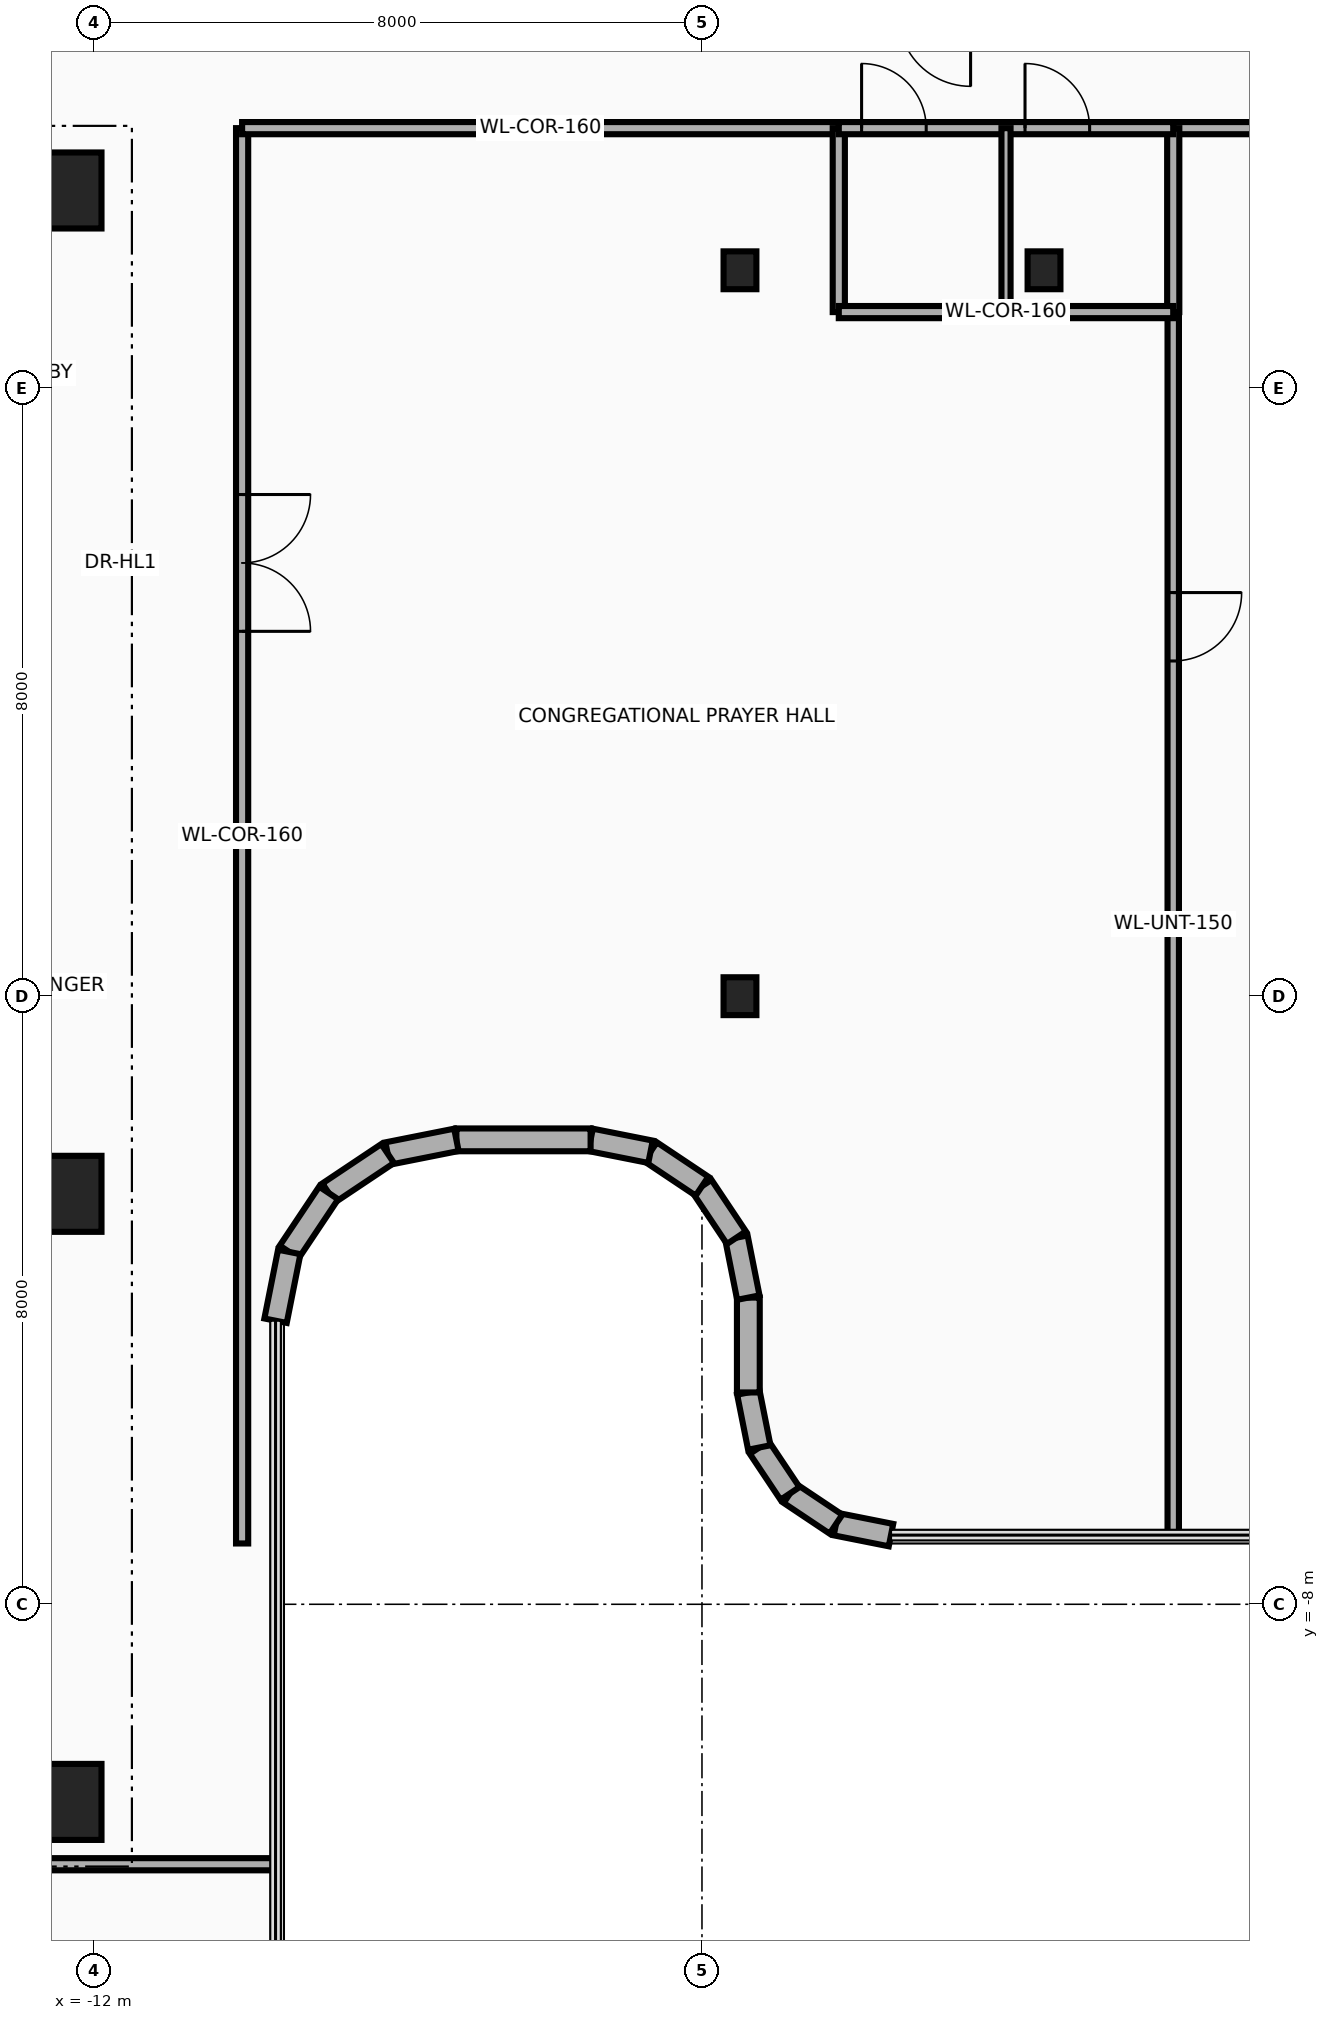
"""IFC4 building model, lengths in metres.
Left out: names, types, materials, properties, quantities, classifications, styles, units other than length and angle.
Written with IfcOpenShell. Run it as: python <this file> out.ifc"""

import sys

from ifc_helpers import new_model, si_unit, direction, frame, frame_2d, origin, origin_2d, place, context, subcontext, project, spatial, rectangle, i_section, extrude, source, transform, mapped, element, fill, save


model = new_model("IFC4")
c1 = context("Model", 3, precision=1e-05, world=origin(), true_north=direction((0.0, 1.0)))
c2 = subcontext(c1, "Body", "Model", "MODEL_VIEW")
j1 = project(units=[si_unit("LENGTHUNIT", "METRE"), si_unit("PLANEANGLEUNIT", "RADIAN")], contexts=[c1])
p1 = place(None, origin())
s1 = spatial("IfcSite", under=j1, at=p1, CompositionType="ELEMENT")
p2 = place(p1, origin())
s2 = spatial("IfcBuilding", under=s1, at=p2, CompositionType="ELEMENT")
p3 = place(p2, frame((0.0, 0.0, 180.5)))
s3 = spatial("IfcBuildingStorey", under=s2, at=p3, CompositionType="ELEMENT", Elevation=180.5)
for number, where, z_axis, x_axis in (
    (1, (-22.65, 10.8, 0.0), (0.0, 0.0, 1.0), (1.0, 0.0, 0.0)),
    (2, (-22.65, -10.8, 0.0), (0.0, 0.0, 1.0), (1.0, 0.0, 0.0)),
):
    element("IfcWall", number, at=place(p3, frame(where, z_axis=z_axis, x_axis=x_axis)), inside=s3, PredefinedType="SHEAR", context=c2, shape_type="SweptSolid", body=[
        extrude(rectangle(XDim=10.25, YDim=0.55, at=frame_2d((5.125, 0.0))), origin(), (0.0, 0.0, 1.0), 3.63),
    ])
m1 = source(origin(), c2, "Body", "SweptSolid", [
    extrude(rectangle(XDim=1.0, YDim=1.0, at=origin_2d()), origin(), (0.0, 0.0, 1.0), 3.95),
])
for number, where, z_axis, x_axis in (
    (3, (-12.4, -10.6, 0.0), (0.0, 0.0, 1.0), (1.0, 0.0, 0.0)),
    (4, (-12.4, -2.6, 0.0), (0.0, 0.0, 1.0), (1.0, 0.0, 0.0)),
    (5, (-12.4, 10.6, 0.0), (0.0, 0.0, 1.0), (1.0, 0.0, 0.0)),
):
    element("IfcColumn", number, at=place(p3, frame(where, z_axis=z_axis, x_axis=x_axis)), inside=s3, PredefinedType="COLUMN", context=c2, shape_type="MappedRepresentation", body=[
        mapped(m1, transform((0.0, 0.0, 0.0), x_axis=(1.0, 0.0, 0.0), y_axis=(0.0, 1.0, 0.0), z_axis=(0.0, 0.0, 1.0), scale=1.0)),
    ])
m2 = source(origin(), c2, "Body", "SweptSolid", [
    extrude(i_section(OverallWidth=0.432, OverallDepth=0.498, WebThickness=0.056, FlangeThickness=0.089, at=origin_2d()), origin(), (0.0, 0.0, 1.0), 3.95),
])
for number, where, z_axis, x_axis in (
    (6, (-3.5, 0.0, 0.0), (0.0, 0.0, 1.0), (1.0, 0.0, 0.0)),
    (7, (-3.5, 9.55, 0.0), (0.0, 0.0, 1.0), (1.0, 0.0, 0.0)),
    (8, (0.5, 9.55, 0.0), (0.0, 0.0, 1.0), (1.0, 0.0, 0.0)),
):
    element("IfcColumn", number, at=place(p3, frame(where, z_axis=z_axis, x_axis=x_axis)), inside=s3, PredefinedType="COLUMN", context=c2, shape_type="MappedRepresentation", body=[
        mapped(m2, transform((0.0, 0.0, 0.0), x_axis=(1.0, 0.0, 0.0), y_axis=(0.0, 1.0, 0.0), z_axis=(0.0, 0.0, 1.0), scale=1.0)),
    ])
p4 = place(p3, frame((-1.513, -7.09, 0.0), z_axis=(0.0, 0.0, 1.0), x_axis=(-0.980783640462, 0.195098566376, 0.0)))
e9 = element("IfcWall", 9, at=p4, inside=s3, PredefinedType="SOLIDWALL", context=c2, shape_type="SweptSolid", body=[
    extrude(rectangle(XDim=0.738, YDim=0.3, at=frame_2d((0.369, 0.0))), origin(), (0.0, 0.0, 1.0), 3.076),
])
p5 = place(p3, frame((-2.237, -6.946, 0.0), z_axis=(0.0, 0.0, 1.0), x_axis=(-0.831378135196, 0.555707113792, 0.0)))
e10 = element("IfcWall", 10, at=p5, inside=s3, PredefinedType="SOLIDWALL", context=c2, shape_type="SweptSolid", body=[
    extrude(rectangle(XDim=0.727, YDim=0.3, at=frame_2d((0.364, 0.0))), origin(), (0.0, 0.0, 1.0), 3.63),
])
p6 = place(p3, frame((-2.842, -6.542, 0.0), z_axis=(0.0, 0.0, 1.0), x_axis=(-0.555784030735, 0.83132671747, 0.0)))
e11 = element("IfcWall", 11, at=p6, inside=s3, PredefinedType="SOLIDWALL", context=c2, shape_type="SweptSolid", body=[
    extrude(rectangle(XDim=0.728, YDim=0.3, at=frame_2d((0.364, 0.0))), origin(), (0.0, 0.0, 1.0), 2.615),
])
p7 = place(p3, frame((-3.246, -5.937, 0.0), z_axis=(0.0, 0.0, 1.0), x_axis=(-0.194780446724, 0.980846867546, 0.0)))
e12 = element("IfcWall", 12, at=p7, inside=s3, PredefinedType="SOLIDWALL", context=c2, shape_type="SweptSolid", body=[
    extrude(rectangle(XDim=0.738, YDim=0.3, at=frame_2d((0.369, 0.0))), origin(), (0.0, 0.0, 1.0), 2.615),
])
p8 = place(p3, frame((-3.39, -5.213, 0.0), z_axis=(0.0, 0.0, 1.0), x_axis=(0.0, 1.0, 0.0)))
e13 = element("IfcWall", 13, at=p8, inside=s3, PredefinedType="SOLIDWALL", context=c2, shape_type="SweptSolid", body=[
    extrude(rectangle(XDim=1.248, YDim=0.3, at=frame_2d((0.624, 0.0))), origin(), (0.0, 0.0, 1.0), 2.615),
])
p9 = place(p3, frame((-3.39, -3.965, 0.0), z_axis=(0.0, 0.0, 1.0), x_axis=(-0.195356525272, 0.980732291726, 0.0)))
e14 = element("IfcWall", 14, at=p9, inside=s3, PredefinedType="SOLIDWALL", context=c2, shape_type="SweptSolid", body=[
    extrude(rectangle(XDim=0.803, YDim=0.3, at=frame_2d((0.402, 0.0))), origin(), (0.0, 0.0, 1.0), 2.615),
])
for number, where, z_axis, x_axis in (
    (15, (-3.547, -3.177, 0.0), (0.0, 0.0, 1.0), (-0.556, 0.831, 0.0)),
    (16, (-4.0, -2.5, 0.0), (0.0, 0.0, 1.0), (-0.831, 0.556, 0.0)),
):
    element("IfcWall", number, at=place(p3, frame(where, z_axis=z_axis, x_axis=x_axis)), inside=s3, PredefinedType="SOLIDWALL", context=c2, shape_type="SweptSolid", body=[
        extrude(rectangle(XDim=0.815, YDim=0.3, at=frame_2d((0.407, 0.0))), origin(), (0.0, 0.0, 1.0), 2.615),
    ])
p10 = place(p3, frame((-4.677, -2.047, 0.0), z_axis=(0.0, 0.0, 1.0), x_axis=(-0.980732291726, 0.195356525272, 0.0)))
e17 = element("IfcWall", 17, at=p10, inside=s3, PredefinedType="SOLIDWALL", context=c2, shape_type="SweptSolid", body=[
    extrude(rectangle(XDim=0.803, YDim=0.3, at=frame_2d((0.402, 0.0))), origin(), (0.0, 0.0, 1.0), 3.63),
])
p11 = place(p3, frame((-5.465, -1.89, 0.0), z_axis=(0.0, 0.0, 1.0), x_axis=(-1.0, 0.0, 0.0)))
e18 = element("IfcWall", 18, at=p11, inside=s3, PredefinedType="SOLIDWALL", context=c2, shape_type="SweptSolid", body=[
    extrude(rectangle(XDim=1.766, YDim=0.3, at=frame_2d((0.883, 0.0))), origin(), (0.0, 0.0, 1.0), 3.63),
])
p12 = place(p3, frame((-7.231, -1.89, 0.0), z_axis=(0.0, 0.0, 1.0), x_axis=(-0.980743190895, -0.195301801101, 0.0)))
e19 = element("IfcWall", 19, at=p12, inside=s3, PredefinedType="SOLIDWALL", context=c2, shape_type="SweptSolid", body=[
    extrude(rectangle(XDim=0.923, YDim=0.3, at=frame_2d((0.461, 0.0))), origin(), (0.0, 0.0, 1.0), 2.415),
])
p13 = place(p3, frame((-8.135, -2.07, 0.0), z_axis=(0.0, 0.0, 1.0), x_axis=(-0.831607331814, -0.555364065883, 0.0)))
e20 = element("IfcWall", 20, at=p13, inside=s3, PredefinedType="SOLIDWALL", context=c2, shape_type="SweptSolid", body=[
    extrude(rectangle(XDim=0.933, YDim=0.3, at=frame_2d((0.467, 0.0))), origin(), (0.0, 0.0, 1.0), 2.415),
])
p14 = place(p3, frame((-8.912, -2.588, 0.0), z_axis=(0.0, 0.0, 1.0), x_axis=(-0.555364065883, -0.831607331814, 0.0)))
e21 = element("IfcWall", 21, at=p14, inside=s3, PredefinedType="SOLIDWALL", context=c2, shape_type="SweptSolid", body=[
    extrude(rectangle(XDim=0.933, YDim=0.3, at=frame_2d((0.467, 0.0))), origin(), (0.0, 0.0, 1.0), 3.63),
])
p15 = place(p3, frame((-9.43, -3.365, 0.0), z_axis=(0.0, 0.0, 1.0), x_axis=(-0.195301801101, -0.980743190895, 0.0)))
e22 = element("IfcWall", 22, at=p15, inside=s3, PredefinedType="SOLIDWALL", context=c2, shape_type="SweptSolid", body=[
    extrude(rectangle(XDim=0.923, YDim=0.3, at=frame_2d((0.461, 0.0))), origin(), (0.0, 0.0, 1.0), 3.63),
])
p16 = place(p3, frame((-23.45, -11.42, 0.0), z_axis=(0.0, 0.0, 1.0), x_axis=(1.0, 0.0, 0.0)))
e23 = element("IfcWall", 23, at=p16, inside=s3, PredefinedType="PARTITIONING", context=c2, shape_type="SweptSolid", body=[
    extrude(rectangle(XDim=13.84, YDim=0.16, at=frame_2d((6.92, 0.0))), origin(), (0.0, 0.0, 1.0), 3.004),
])
p17 = place(p3, frame((-10.05, -7.2, 0.0), z_axis=(0.0, 0.0, 1.0), x_axis=(0.0, 1.0, 0.0)))
e24 = element("IfcWall", 24, at=p17, inside=s3, PredefinedType="PARTITIONING", context=c2, shape_type="SweptSolid", body=[
    extrude(rectangle(XDim=18.62, YDim=0.16, at=frame_2d((9.31, 0.0))), origin(), (0.0, 0.0, 1.0), 2.415),
])
p18 = place(p17, frame((12.0, 0.0, 0.0)))
e25 = element("IfcOpeningElement", 25, at=p18, cuts=e24, PredefinedType="OPENING", context=c2, shape_type="SweptSolid", body=[
    extrude(rectangle(XDim=1.8, YDim=2.15, at=frame_2d((0.9, 1.075))), frame((0.0, 0.095, 0.0), z_axis=(0.0, -1.0, 0.0), x_axis=(1.0, 0.0, 0.0)), (0.0, 0.0, 1.0), 0.19),
])
p19 = place(p3, frame((-10.05, 11.42, 0.0), z_axis=(0.0, 0.0, 1.0), x_axis=(1.0, 0.0, 0.0)))
e26 = element("IfcWall", 26, at=p19, inside=s3, PredefinedType="PARTITIONING", context=c2, shape_type="SweptSolid", body=[
    extrude(rectangle(XDim=7.85, YDim=0.16, at=frame_2d((3.925, 0.0))), origin(), (0.0, 0.0, 1.0), 2.615),
])
p20 = place(p3, frame((2.2, 11.42, 0.0), z_axis=(0.0, 0.0, 1.0), x_axis=(1.0, 0.0, 0.0)))
e27 = element("IfcWall", 27, at=p20, inside=s3, PredefinedType="PARTITIONING", context=c2, shape_type="SweptSolid", body=[
    extrude(rectangle(XDim=11.22, YDim=0.16, at=frame_2d((5.61, 0.0))), origin(), (0.0, 0.0, 1.0), 2.615),
])
p21 = place(p20, frame((4.0, 0.0, 0.0)))
e28 = element("IfcOpeningElement", 28, at=p21, cuts=e27, PredefinedType="OPENING", context=c2, shape_type="SweptSolid", body=[
    extrude(rectangle(XDim=1.8, YDim=2.15, at=frame_2d((0.9, 1.075))), frame((0.0, 0.095, 0.0), z_axis=(0.0, -1.0, 0.0), x_axis=(1.0, 0.0, 0.0)), (0.0, 0.0, 1.0), 0.19),
])
p22 = place(p3, frame((2.2, -7.09, 0.0), z_axis=(0.0, 0.0, 1.0), x_axis=(0.0, 1.0, 0.0)))
e29 = element("IfcWall", 29, at=p22, inside=s3, PredefinedType="PARTITIONING", context=c2, shape_type="SweptSolid", body=[
    extrude(rectangle(XDim=16.09, YDim=0.15, at=frame_2d((8.045, 0.0))), origin(), (0.0, 0.0, 1.0), 2.665),
])
p23 = place(p22, frame((11.5, 0.0, 0.0)))
e30 = element("IfcOpeningElement", 30, at=p23, cuts=e29, PredefinedType="OPENING", context=c2, shape_type="SweptSolid", body=[
    extrude(rectangle(XDim=0.9, YDim=2.1, at=frame_2d((0.45, 1.05))), frame((0.0, 0.09, 0.0), z_axis=(0.0, -1.0, 0.0), x_axis=(1.0, 0.0, 0.0)), (0.0, 0.0, 1.0), 0.18),
])
for number, where, z_axis, x_axis in (
    (31, (-2.2, 9.0, 0.0), (0.0, 0.0, 1.0), (0.0, 1.0, 0.0)),
    (32, (2.2, 9.0, 0.0), (0.0, 0.0, 1.0), (0.0, 1.0, 0.0)),
):
    element("IfcWall", number, at=place(p3, frame(where, z_axis=z_axis, x_axis=x_axis)), inside=s3, PredefinedType="PARTITIONING", context=c2, shape_type="SweptSolid", body=[
        extrude(rectangle(XDim=2.42, YDim=0.16, at=frame_2d((1.21, 0.0))), origin(), (0.0, 0.0, 1.0), 2.665),
    ])
p24 = place(p3, frame((-2.2, 9.0, 0.0), z_axis=(0.0, 0.0, 1.0), x_axis=(1.0, 0.0, 0.0)))
e33 = element("IfcWall", 33, at=p24, inside=s3, PredefinedType="PARTITIONING", context=c2, shape_type="SweptSolid", body=[
    extrude(rectangle(XDim=4.4, YDim=0.16, at=frame_2d((2.2, 0.0))), origin(), (0.0, 0.0, 1.0), 3.63),
])
p25 = place(p3, frame((-2.2, 11.42, 0.0), z_axis=(0.0, 0.0, 1.0), x_axis=(1.0, 0.0, 0.0)))
e34 = element("IfcWall", 34, at=p25, inside=s3, PredefinedType="PARTITIONING", context=c2, shape_type="SweptSolid", body=[
    extrude(rectangle(XDim=4.4, YDim=0.16, at=frame_2d((2.2, 0.0))), origin(), (0.0, 0.0, 1.0), 3.63),
])
p26 = place(p25, frame((0.3, 0.0, 0.0)))
e35 = element("IfcOpeningElement", 35, at=p26, cuts=e34, PredefinedType="OPENING", context=c2, shape_type="SweptSolid", body=[
    extrude(rectangle(XDim=0.85, YDim=2.1, at=frame_2d((0.425, 1.05))), frame((0.0, 0.095, 0.0), z_axis=(0.0, -1.0, 0.0), x_axis=(1.0, 0.0, 0.0)), (0.0, 0.0, 1.0), 0.19),
])
p27 = place(p25, frame((2.45, 0.0, 0.0)))
e36 = element("IfcOpeningElement", 36, at=p27, cuts=e34, PredefinedType="OPENING", context=c2, shape_type="SweptSolid", body=[
    extrude(rectangle(XDim=0.85, YDim=2.1, at=frame_2d((0.425, 1.05))), frame((0.0, 0.095, 0.0), z_axis=(0.0, -1.0, 0.0), x_axis=(1.0, 0.0, 0.0)), (0.0, 0.0, 1.0), 0.19),
])
p28 = place(p3, frame((0.0, 9.0, 0.0), z_axis=(0.0, 0.0, 1.0), x_axis=(0.0, 1.0, 0.0)))
e37 = element("IfcWall", 37, at=p28, inside=s3, PredefinedType="PARTITIONING", context=c2, shape_type="SweptSolid", body=[
    extrude(rectangle(XDim=2.42, YDim=0.12, at=frame_2d((1.21, 0.0))), origin(), (0.0, 0.0, 1.0), 2.665),
])
p29 = place(p18, frame((1.8, 0.0, 0.0), z_axis=(0.0, 0.0, 1.0), x_axis=(-1.0, 0.0, 0.0)))
e38 = element("IfcDoor", 38, at=p29, inside=s3, OperationType="DOUBLE_DOOR_SINGLE_SWING", PredefinedType="DOOR", context=c2, shape_type="SweptSolid", body=[
    extrude(rectangle(XDim=1.8, YDim=2.15, at=frame_2d((0.9, 1.075))), frame((0.0, 0.025, 0.0), z_axis=(0.0, -1.0, 0.0), x_axis=(1.0, 0.0, 0.0)), (0.0, 0.0, 1.0), 0.05),
])
fill(e25, e38)
p30 = place(p23, frame((0.9, 0.0, 0.0), z_axis=(0.0, 0.0, 1.0), x_axis=(-1.0, 0.0, 0.0)))
e39 = element("IfcDoor", 39, at=p30, inside=s3, OperationType="SINGLE_SWING_LEFT", PredefinedType="DOOR", context=c2, shape_type="SweptSolid", body=[
    extrude(rectangle(XDim=0.9, YDim=2.1, at=frame_2d((0.45, 1.05))), frame((0.0, 0.025, 0.0), z_axis=(0.0, -1.0, 0.0), x_axis=(1.0, 0.0, 0.0)), (0.0, 0.0, 1.0), 0.05),
])
fill(e30, e39)
p31 = place(p26, origin())
e40 = element("IfcDoor", 40, at=p31, inside=s3, OperationType="SINGLE_SWING_RIGHT", PredefinedType="DOOR", context=c2, shape_type="SweptSolid", body=[
    extrude(rectangle(XDim=0.85, YDim=2.1, at=frame_2d((0.425, 1.05))), frame((0.0, 0.025, 0.0), z_axis=(0.0, -1.0, 0.0), x_axis=(1.0, 0.0, 0.0)), (0.0, 0.0, 1.0), 0.05),
])
fill(e35, e40)
p32 = place(p27, origin())
e41 = element("IfcDoor", 41, at=p32, inside=s3, OperationType="SINGLE_SWING_LEFT", PredefinedType="DOOR", context=c2, shape_type="SweptSolid", body=[
    extrude(rectangle(XDim=0.85, YDim=2.1, at=frame_2d((0.425, 1.05))), frame((0.0, 0.025, 0.0), z_axis=(0.0, -1.0, 0.0), x_axis=(1.0, 0.0, 0.0)), (0.0, 0.0, 1.0), 0.05),
])
fill(e36, e41)
save(model, sys.argv[1])
